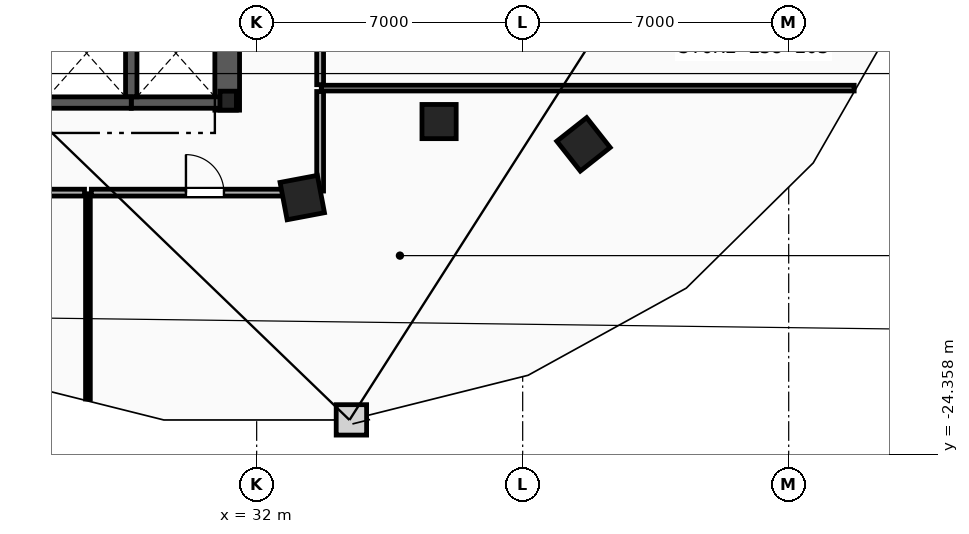
"""IFC4 building model, lengths in metres.
Left out: names, types, materials, properties, quantities, classifications, styles, units other than length and angle.
Written with IfcOpenShell. Run it as: python <this file> out.ifc"""

import sys

from ifc_helpers import new_model, si_unit, direction, frame, frame_2d, origin, origin_2d, place, context, subcontext, project, spatial, rectangle, i_section, extrude, element, fill, save


model = new_model("IFC4")
c1 = context("Model", 3, precision=1e-05, world=origin(), true_north=direction((0.0, 1.0)))
c2 = subcontext(c1, "Body", "Model", "MODEL_VIEW")
j1 = project(units=[si_unit("LENGTHUNIT", "METRE"), si_unit("PLANEANGLEUNIT", "RADIAN")], contexts=[c1])
p1 = place(None, origin())
s1 = spatial("IfcSite", under=j1, at=p1, CompositionType="ELEMENT")
p2 = place(p1, origin())
s2 = spatial("IfcBuilding", under=s1, at=p2, CompositionType="ELEMENT")
p3 = place(p2, frame((0.0, 0.0, 147.6)))
s3 = spatial("IfcBuildingStorey", under=s2, at=p3, CompositionType="ELEMENT", Elevation=147.6)
p4 = place(p3, frame((31.25, -15.05, 0.0), z_axis=(0.0, 0.0, 1.0), x_axis=(1.0, 0.0, 0.0)))
e1 = element("IfcColumn", 1, at=p4, inside=s3, PredefinedType="COLUMN", context=c2, shape_type="SweptSolid", body=[
    extrude(i_section(OverallWidth=0.432, OverallDepth=0.498, WebThickness=0.056, FlangeThickness=0.089, FilletRadius=0.018, at=origin_2d()), origin(), (0.0, 0.0, 1.0), 3.6),
])
p5 = place(p3, frame((36.8, -15.6, 0.0), z_axis=(0.0, 0.0, 1.0), x_axis=(1.0, 0.0, 0.0)))
e2 = element("IfcColumn", 2, at=p5, inside=s3, PredefinedType="COLUMN", context=c2, shape_type="SweptSolid", body=[
    extrude(rectangle(XDim=0.9, YDim=0.9, at=origin_2d()), origin(), (0.0, 0.0, 1.0), 3.6),
])
for number, where, z_axis, x_axis in (
    (3, (33.2, -17.6, 0.0), (0.0, 0.0, 1.0), (0.983, 0.186, 0.0)),
    (4, (40.6, -16.2, 0.0), (0.0, 0.0, 1.0), (0.785, 0.619, 0.0)),
):
    element("IfcColumn", number, at=place(p3, frame(where, z_axis=z_axis, x_axis=x_axis)), inside=s3, PredefinedType="COLUMN", context=c2, shape_type="SweptSolid", body=[
        extrude(rectangle(XDim=1.0, YDim=1.0, at=origin_2d()), origin(), (0.0, 0.0, 1.0), 3.6),
    ])
p6 = place(p3, frame((31.225, -15.3, 0.0), z_axis=(0.0, 0.0, 1.0), x_axis=(0.0, 1.0, 0.0)))
e5 = element("IfcWall", 5, at=p6, inside=s3, PredefinedType="SHEAR", context=c2, shape_type="SweptSolid", body=[
    extrude(rectangle(XDim=13.33, YDim=0.65, at=frame_2d((6.665, 0.0))), origin(), (0.0, 0.0, 1.0), 3.36),
])
p7 = place(p3, frame((28.7, -15.1, 0.0), z_axis=(0.0, 0.0, 1.0), x_axis=(1.0, 0.0, 0.0)))
e6 = element("IfcWall", 6, at=p7, inside=s3, PredefinedType="SHEAR", context=c2, shape_type="SweptSolid", body=[
    extrude(rectangle(XDim=2.5, YDim=0.3, at=frame_2d((1.25, 0.0))), origin(), (0.0, 0.0, 1.0), 3.36),
])
p8 = place(p3, frame((28.7, -14.95, 0.0), z_axis=(0.0, 0.0, 1.0), x_axis=(0.0, 1.0, 0.0)))
e7 = element("IfcWall", 7, at=p8, inside=s3, PredefinedType="SHEAR", context=c2, shape_type="SweptSolid", body=[
    extrude(rectangle(XDim=2.3, YDim=0.3, at=frame_2d((1.15, 0.0))), origin(), (0.0, 0.0, 1.0), 3.36),
])
p9 = place(p3, frame((26.2, -15.1, 0.0), z_axis=(0.0, 0.0, 1.0), x_axis=(1.0, 0.0, 0.0)))
e8 = element("IfcWall", 8, at=p9, inside=s3, PredefinedType="SHEAR", context=c2, shape_type="SweptSolid", body=[
    extrude(rectangle(XDim=2.5, YDim=0.3, at=frame_2d((1.25, 0.0))), origin(), (0.0, 0.0, 1.0), 3.36),
])
p10 = place(p3, frame((33.7, -14.72, 0.0), z_axis=(0.0, 0.0, 1.0), x_axis=(1.0, 0.0, 0.0)))
e9 = element("IfcWall", 9, at=p10, inside=s3, PredefinedType="PARTITIONING", context=c2, shape_type="SweptSolid", body=[
    extrude(rectangle(XDim=14.023, YDim=0.15, at=frame_2d((7.011, 0.0))), origin(), (0.0, 0.0, 1.0), 3.36),
])
p11 = place(p3, frame((27.56, -22.901, 0.0), z_axis=(0.0, 0.0, 1.0), x_axis=(0.0, 1.0, 0.0)))
e10 = element("IfcWall", 10, at=p11, inside=s3, PredefinedType="PARTITIONING", context=c2, shape_type="SweptSolid", body=[
    extrude(rectangle(XDim=5.401, YDim=0.125, at=frame_2d((2.701, 0.0))), origin(), (0.0, 0.0, 1.0), 3.36),
])
p12 = place(p3, frame((18.342, -17.47, 0.0), z_axis=(0.0, 0.0, 1.0), x_axis=(1.0, 0.0, 0.0)))
e11 = element("IfcWall", 11, at=p12, inside=s3, PredefinedType="PARTITIONING", context=c2, shape_type="SweptSolid", body=[
    extrude(rectangle(XDim=9.128, YDim=0.18, at=frame_2d((4.564, 0.0))), origin(), (0.0, 0.0, 1.0), 3.36),
])
p13 = place(p12, frame((4.064, 0.0, 0.0)))
e12 = element("IfcOpeningElement", 12, at=p13, cuts=e11, PredefinedType="OPENING", context=c2, shape_type="SweptSolid", body=[
    extrude(rectangle(XDim=1.0, YDim=2.15, at=frame_2d((0.5, 1.075))), frame((0.0, 0.1, 0.0), z_axis=(0.0, -1.0, 0.0), x_axis=(1.0, 0.0, 0.0)), (0.0, 0.0, 1.0), 0.2),
])
p14 = place(p3, frame((27.65, -17.47, 0.0), z_axis=(0.0, 0.0, 1.0), x_axis=(1.0, 0.0, 0.0)))
e13 = element("IfcWall", 13, at=p14, inside=s3, PredefinedType="PARTITIONING", context=c2, shape_type="SweptSolid", body=[
    extrude(rectangle(XDim=5.979, YDim=0.18, at=frame_2d((2.989, 0.0))), origin(), (0.0, 0.0, 1.0), 3.36),
])
p15 = place(p14, frame((2.489, 0.0, 0.0)))
e14 = element("IfcOpeningElement", 14, at=p15, cuts=e13, PredefinedType="OPENING", context=c2, shape_type="SweptSolid", body=[
    extrude(rectangle(XDim=1.0, YDim=2.15, at=frame_2d((0.5, 1.075))), frame((0.0, 0.1, 0.0), z_axis=(0.0, -1.0, 0.0), x_axis=(1.0, 0.0, 0.0)), (0.0, 0.0, 1.0), 0.2),
])
p16 = place(p3, frame((33.67, -17.428, 0.0), z_axis=(0.0, 0.0, 1.0), x_axis=(0.0, 1.0, 0.0)))
e15 = element("IfcWall", 15, at=p16, inside=s3, PredefinedType="PARTITIONING", context=c2, shape_type="SweptSolid", body=[
    extrude(rectangle(XDim=2.618, YDim=0.18, at=frame_2d((1.309, 0.0))), origin(), (0.0, 0.0, 1.0), 3.36),
])
p17 = place(p3, frame((33.67, -14.63, 0.0), z_axis=(0.0, 0.0, 1.0), x_axis=(0.0, 1.0, 0.0)))
e16 = element("IfcWall", 16, at=p17, inside=s3, PredefinedType="PARTITIONING", context=c2, shape_type="SweptSolid", body=[
    extrude(rectangle(XDim=1.73, YDim=0.18, at=frame_2d((0.865, 0.0))), origin(), (0.0, 0.0, 1.0), 3.36),
])
p18 = place(p15, origin())
e17 = element("IfcDoor", 17, at=p18, inside=s3, OperationType="SINGLE_SWING_LEFT", PredefinedType="DOOR", context=c2, shape_type="SweptSolid", body=[
    extrude(rectangle(XDim=1.0, YDim=2.15, at=frame_2d((0.5, 1.075))), frame((0.0, 0.025, 0.0), z_axis=(0.0, -1.0, 0.0), x_axis=(1.0, 0.0, 0.0)), (0.0, 0.0, 1.0), 0.05),
])
fill(e14, e17)
save(model, sys.argv[1])
